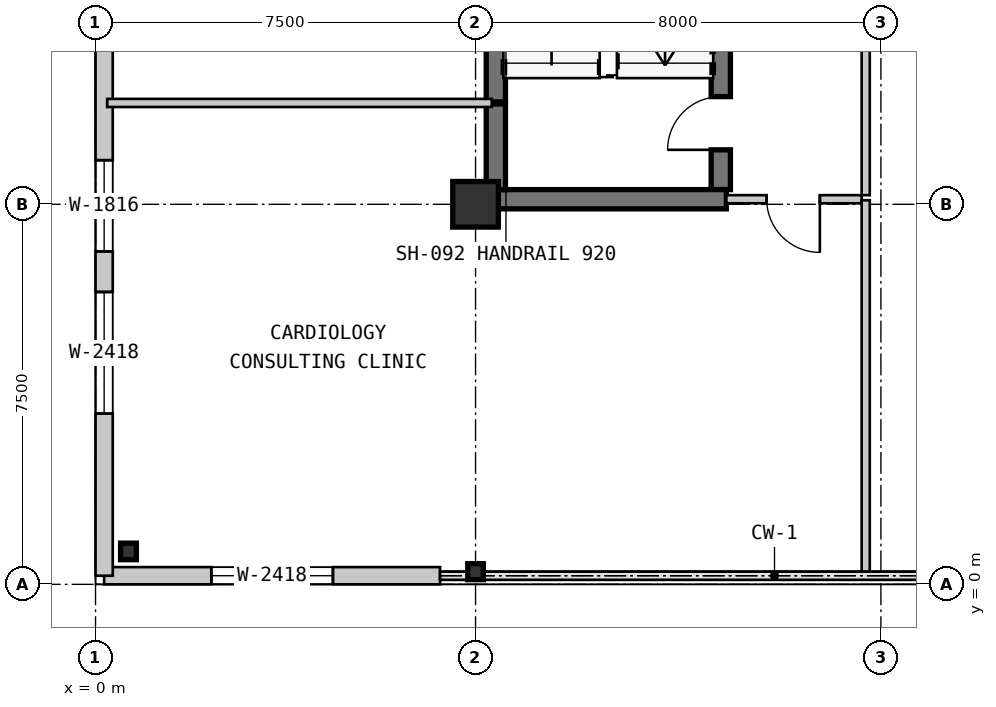
"""IFC4 building model, lengths in metres.
Left out: names, types, materials, properties, quantities, classifications, styles, units other than length and angle.
Written with IfcOpenShell. Run it as: python <this file> out.ifc"""

import sys

from ifc_helpers import new_model, si_unit, direction, frame, frame_2d, origin, origin_2d, place, context, subcontext, project, spatial, rectangle, circle, i_section, extrude, source, transform, mapped, element, fill, save


model = new_model("IFC4")
c1 = context("Model", 3, precision=1e-05, world=origin(), true_north=direction((0.0, 1.0)))
c2 = subcontext(c1, "Body", "Model", "MODEL_VIEW")
j1 = project(units=[si_unit("LENGTHUNIT", "METRE"), si_unit("PLANEANGLEUNIT", "RADIAN")], contexts=[c1])
p1 = place(None, origin())
s1 = spatial("IfcSite", under=j1, at=p1, CompositionType="ELEMENT")
p2 = place(p1, origin())
s2 = spatial("IfcBuilding", under=s1, at=p2, CompositionType="ELEMENT")
p3 = place(p2, frame((0.0, 0.0, 4.55)))
s3 = spatial("IfcBuildingStorey", under=s2, at=p3, CompositionType="ELEMENT", Elevation=4.55)
m1 = source(origin(), c2, "Body", "SweptSolid", [
    extrude(circle(Radius=0.45, at=origin_2d()), origin(), (0.0, 0.0, 1.0), 3.85),
])
p4 = place(p3, frame((7.5, 7.5, 0.0), z_axis=(0.0, 0.0, 1.0), x_axis=(1.0, 0.0, 0.0)))
e1 = element("IfcColumn", 1, at=p4, inside=s3, PredefinedType="COLUMN", context=c2, shape_type="MappedRepresentation", body=[
    mapped(m1, transform((0.0, 0.0, 0.0), scale=1.0)),
])
m2 = source(origin(), c2, "Body", "SweptSolid", [
    extrude(i_section(OverallWidth=0.311, OverallDepth=0.327, WebThickness=0.016, FlangeThickness=0.025, at=origin_2d()), origin(), (0.0, 0.0, 1.0), 3.85),
])
p5 = place(p3, frame((0.65, 0.65, 0.0), z_axis=(0.0, 0.0, 1.0), x_axis=(1.0, 0.0, 0.0)))
e2 = element("IfcColumn", 2, at=p5, inside=s3, PredefinedType="COLUMN", context=c2, shape_type="MappedRepresentation", body=[
    mapped(m2, transform((0.0, 0.0, 0.0), scale=1.0)),
])
m3 = source(origin(), c2, "Body", "SweptSolid", [
    extrude(i_section(OverallWidth=0.307, OverallDepth=0.315, WebThickness=0.012, FlangeThickness=0.019, at=origin_2d()), origin(), (0.0, 0.0, 1.0), 3.85),
])
p6 = place(p3, frame((7.5, 0.25, 0.0), z_axis=(0.0, 0.0, 1.0), x_axis=(1.0, 0.0, 0.0)))
e3 = element("IfcColumn", 3, at=p6, inside=s3, PredefinedType="PILASTER", context=c2, shape_type="MappedRepresentation", body=[
    mapped(m3, transform((0.0, 0.0, 0.0), scale=1.0)),
])
m4 = source(origin(), c2, "Body", "SweptSolid", [
    extrude(rectangle(XDim=6.63, YDim=0.34, at=frame_2d((3.315, 0.0))), origin(), (0.0, 0.0, 1.0), 3.59),
])
p7 = place(p3, frame((0.17, 0.17, 0.0), z_axis=(0.0, 0.0, 1.0), x_axis=(1.0, 0.0, 0.0)))
e4 = element("IfcWall", 4, at=p7, inside=s3, PredefinedType="SOLIDWALL", context=c2, shape_type="MappedRepresentation", body=[
    mapped(m4, transform((0.0, 0.0, 0.0), scale=1.0)),
])
m5 = source(origin(), c2, "Body", "SweptSolid", [
    extrude(rectangle(XDim=2.4, YDim=1.8, at=frame_2d((1.2, 0.9))), frame((0.0, 0.18, 0.0), z_axis=(0.0, -1.0, 0.0), x_axis=(1.0, 0.0, 0.0)), (0.0, 0.0, 1.0), 0.36),
])
p8 = place(p7, frame((2.115, 0.0, 0.9)))
e5 = element("IfcOpeningElement", 5, at=p8, cuts=e4, PredefinedType="OPENING", context=c2, shape_type="MappedRepresentation", body=[
    mapped(m5, transform((0.0, 0.0, 0.0), scale=1.0)),
])
m6 = source(origin(), c2, "Body", "SweptSolid", [
    extrude(rectangle(XDim=39.66, YDim=0.34, at=frame_2d((19.83, 0.0))), origin(), (0.0, 0.0, 1.0), 3.59),
])
p9 = place(p3, frame((0.17, 0.17, 0.0), z_axis=(0.0, 0.0, 1.0), x_axis=(0.0, 1.0, 0.0)))
e6 = element("IfcWall", 6, at=p9, inside=s3, PredefinedType="SOLIDWALL", context=c2, shape_type="MappedRepresentation", body=[
    mapped(m6, transform((0.0, 0.0, 0.0), scale=1.0)),
])
p10 = place(p9, frame((3.2, 0.0, 0.95)))
e7 = element("IfcOpeningElement", 7, at=p10, cuts=e6, PredefinedType="OPENING", context=c2, shape_type="MappedRepresentation", body=[
    mapped(m5, transform((0.0, 0.0, 0.0), scale=1.0)),
])
m7 = source(origin(), c2, "Body", "SweptSolid", [
    extrude(rectangle(XDim=1.8, YDim=1.6, at=frame_2d((0.9, 0.8))), frame((0.0, 0.18, 0.0), z_axis=(0.0, -1.0, 0.0), x_axis=(1.0, 0.0, 0.0)), (0.0, 0.0, 1.0), 0.36),
])
p11 = place(p9, frame((6.4, 0.0, 0.95)))
e8 = element("IfcOpeningElement", 8, at=p11, cuts=e6, PredefinedType="OPENING", context=c2, shape_type="MappedRepresentation", body=[
    mapped(m7, transform((0.0, 0.0, 0.0), scale=1.0)),
])
m8 = source(origin(), c2, "Body", "SweptSolid", [
    extrude(rectangle(XDim=1.5, YDim=1.5, at=frame_2d((0.75, 0.75))), frame((0.0, 0.18, 0.0), z_axis=(0.0, -1.0, 0.0), x_axis=(1.0, 0.0, 0.0)), (0.0, 0.0, 1.0), 0.36),
])
p12 = place(p9, frame((22.6, 0.0, 0.95)))
e9 = element("IfcOpeningElement", 9, at=p12, cuts=e6, PredefinedType="OPENING", context=c2, shape_type="MappedRepresentation", body=[
    mapped(m8, transform((0.0, 0.0, 0.0), scale=1.0)),
])
m9 = source(origin(), c2, "Body", "SweptSolid", [
    extrude(rectangle(XDim=1.2, YDim=1.5, at=frame_2d((0.6, 0.75))), frame((0.0, 0.18, 0.0), z_axis=(0.0, -1.0, 0.0), x_axis=(1.0, 0.0, 0.0)), (0.0, 0.0, 1.0), 0.36),
])
p13 = place(p9, frame((34.6, 0.0, 0.95)))
e10 = element("IfcOpeningElement", 10, at=p13, cuts=e6, PredefinedType="OPENING", context=c2, shape_type="MappedRepresentation", body=[
    mapped(m9, transform((0.0, 0.0, 0.0), scale=1.0)),
])
m10 = source(origin(), c2, "Body", "SweptSolid", [
    extrude(rectangle(XDim=8.22, YDim=0.38, at=frame_2d((4.11, 0.0))), origin(), (0.0, 0.0, 1.0), 3.59),
])
p14 = place(p3, frame((12.34, 16.01, 0.0), z_axis=(0.0, 0.0, 1.0), x_axis=(0.0, -1.0, 0.0)))
e11 = element("IfcWall", 11, at=p14, inside=s3, PredefinedType="SHEAR", context=c2, shape_type="MappedRepresentation", body=[
    mapped(m10, transform((0.0, 0.0, 0.0), scale=1.0)),
])
m11 = source(origin(), c2, "Body", "SweptSolid", [
    extrude(rectangle(XDim=1.05, YDim=2.1, at=frame_2d((0.525, 1.05))), frame((0.0, 0.2, 0.0), z_axis=(0.0, -1.0, 0.0), x_axis=(1.0, 0.0, 0.0)), (0.0, 0.0, 1.0), 0.4),
])
p15 = place(p14, frame((6.385, 0.0, 0.0)))
e12 = element("IfcOpeningElement", 12, at=p15, cuts=e11, PredefinedType="OPENING", context=c2, shape_type="MappedRepresentation", body=[
    mapped(m11, transform((0.0, 0.0, 0.0), scale=1.0)),
])
m12 = source(origin(), c2, "Body", "SweptSolid", [
    extrude(rectangle(XDim=4.66, YDim=0.38, at=frame_2d((2.33, 0.0))), origin(), (0.0, 0.0, 1.0), 3.59),
])
p16 = place(p3, frame((12.45, 7.6, 0.0), z_axis=(0.0, 0.0, 1.0), x_axis=(-1.0, 0.0, 0.0)))
e13 = element("IfcWall", 13, at=p16, inside=s3, PredefinedType="SHEAR", context=c2, shape_type="MappedRepresentation", body=[
    mapped(m12, transform((0.0, 0.0, 0.0), scale=1.0)),
])
m13 = source(origin(), c2, "Body", "SweptSolid", [
    extrude(rectangle(XDim=1.69, YDim=0.38, at=frame_2d((0.845, 0.0))), origin(), (0.0, 0.0, 1.0), 3.59),
])
p17 = place(p3, frame((7.9, 7.79, 0.0), z_axis=(0.0, 0.0, 1.0), x_axis=(0.0, 1.0, 0.0)))
e14 = element("IfcWall", 14, at=p17, inside=s3, PredefinedType="SHEAR", context=c2, shape_type="MappedRepresentation", body=[
    mapped(m13, transform((0.0, 0.0, 0.0), scale=1.0)),
])
m14 = source(origin(), c2, "Body", "SweptSolid", [
    extrude(rectangle(XDim=6.49, YDim=0.38, at=frame_2d((3.245, 0.0))), origin(), (0.0, 0.0, 1.0), 3.59),
])
p18 = place(p3, frame((7.9, 9.52, 0.0), z_axis=(0.0, 0.0, 1.0), x_axis=(0.0, 1.0, 0.0)))
e15 = element("IfcWall", 15, at=p18, inside=s3, PredefinedType="SHEAR", context=c2, shape_type="MappedRepresentation", body=[
    mapped(m14, transform((0.0, 0.0, 0.0), scale=1.0)),
])
m15 = source(origin(), c2, "Body", "SweptSolid", [
    extrude(rectangle(XDim=13.44, YDim=0.16, at=frame_2d((6.72, 0.0))), origin(), (0.0, 0.0, 1.0), 3.59),
])
p19 = place(p3, frame((15.2, 21.12, 0.0), z_axis=(0.0, 0.0, 1.0), x_axis=(0.0, -1.0, 0.0)))
e16 = element("IfcWall", 16, at=p19, inside=s3, PredefinedType="PARTITIONING", context=c2, shape_type="MappedRepresentation", body=[
    mapped(m15, transform((0.0, 0.0, 0.0), scale=1.0)),
])
m16 = source(origin(), c2, "Body", "SweptSolid", [
    extrude(rectangle(XDim=1.05, YDim=2.1, at=frame_2d((0.525, 1.05))), frame((0.0, 0.09, 0.0), z_axis=(0.0, -1.0, 0.0), x_axis=(1.0, 0.0, 0.0)), (0.0, 0.0, 1.0), 0.18),
])
p20 = place(p19, frame((6.165, 0.0, 0.0)))
e17 = element("IfcOpeningElement", 17, at=p20, cuts=e16, PredefinedType="OPENING", context=c2, shape_type="MappedRepresentation", body=[
    mapped(m16, transform((0.0, 0.0, 0.0), scale=1.0)),
])
m17 = source(origin(), c2, "Body", "SweptSolid", [
    extrude(rectangle(XDim=2.67, YDim=0.16, at=frame_2d((1.335, 0.0))), origin(), (0.0, 0.0, 1.0), 3.59),
])
p21 = place(p3, frame((15.12, 7.6, 0.0), z_axis=(0.0, 0.0, 1.0), x_axis=(-1.0, 0.0, 0.0)))
e18 = element("IfcWall", 18, at=p21, inside=s3, PredefinedType="PARTITIONING", context=c2, shape_type="MappedRepresentation", body=[
    mapped(m17, transform((0.0, 0.0, 0.0), scale=1.0)),
])
p22 = place(p21, frame((0.825, 0.0, 0.0)))
e19 = element("IfcOpeningElement", 19, at=p22, cuts=e18, PredefinedType="OPENING", context=c2, shape_type="MappedRepresentation", body=[
    mapped(m16, transform((0.0, 0.0, 0.0), scale=1.0)),
])
m18 = source(origin(), c2, "Body", "SweptSolid", [
    extrude(rectangle(XDim=7.35, YDim=0.16, at=frame_2d((3.675, 0.0))), origin(), (0.0, 0.0, 1.0), 3.59),
])
p23 = place(p3, frame((15.2, 0.23, 0.0), z_axis=(0.0, 0.0, 1.0), x_axis=(0.0, 1.0, 0.0)))
e20 = element("IfcWall", 20, at=p23, inside=s3, PredefinedType="PARTITIONING", context=c2, shape_type="MappedRepresentation", body=[
    mapped(m18, transform((0.0, 0.0, 0.0), scale=1.0)),
])
m19 = source(origin(), c2, "Body", "SweptSolid", [
    extrude(rectangle(XDim=7.59, YDim=0.16, at=frame_2d((3.795, 0.0))), origin(), (0.0, 0.0, 1.0), 3.59),
])
p24 = place(p3, frame((0.23, 9.5, 0.0), z_axis=(0.0, 0.0, 1.0), x_axis=(1.0, 0.0, 0.0)))
e21 = element("IfcWall", 21, at=p24, inside=s3, PredefinedType="PARTITIONING", context=c2, shape_type="MappedRepresentation", body=[
    mapped(m19, transform((0.0, 0.0, 0.0), scale=1.0)),
])
m20 = source(origin(), c2, "Body", "SweptSolid", [
    extrude(rectangle(XDim=2.4, YDim=1.8, at=frame_2d((1.2, 0.9))), frame((0.0, 0.03, 0.0), z_axis=(0.0, -1.0, 0.0), x_axis=(1.0, 0.0, 0.0)), (0.0, 0.0, 1.0), 0.06),
])
p25 = place(p8, origin())
e22 = element("IfcWindow", 22, at=p25, inside=s3, PartitioningType="SINGLE_PANEL", PredefinedType="WINDOW", context=c2, shape_type="MappedRepresentation", body=[
    mapped(m20, transform((0.0, 0.0, 0.0), scale=1.0)),
])
fill(e5, e22)
p26 = place(p10, origin())
e23 = element("IfcWindow", 23, at=p26, inside=s3, PartitioningType="SINGLE_PANEL", PredefinedType="WINDOW", context=c2, shape_type="MappedRepresentation", body=[
    mapped(m20, transform((0.0, 0.0, 0.0), scale=1.0)),
])
fill(e7, e23)
m21 = source(origin(), c2, "Body", "SweptSolid", [
    extrude(rectangle(XDim=1.8, YDim=1.6, at=frame_2d((0.9, 0.8))), frame((0.0, 0.03, 0.0), z_axis=(0.0, -1.0, 0.0), x_axis=(1.0, 0.0, 0.0)), (0.0, 0.0, 1.0), 0.06),
])
p27 = place(p11, origin())
e24 = element("IfcWindow", 24, at=p27, inside=s3, PartitioningType="SINGLE_PANEL", PredefinedType="WINDOW", context=c2, shape_type="MappedRepresentation", body=[
    mapped(m21, transform((0.0, 0.0, 0.0), scale=1.0)),
])
fill(e8, e24)
m22 = source(origin(), c2, "Body", "SweptSolid", [
    extrude(rectangle(XDim=1.05, YDim=2.1, at=frame_2d((0.525, 1.05))), frame((0.0, 0.025, 0.0), z_axis=(0.0, -1.0, 0.0), x_axis=(1.0, 0.0, 0.0)), (0.0, 0.0, 1.0), 0.05),
])
p28 = place(p15, frame((1.05, 0.0, 0.0), z_axis=(0.0, 0.0, 1.0), x_axis=(-1.0, 0.0, 0.0)))
e25 = element("IfcDoor", 25, at=p28, inside=s3, OperationType="SINGLE_SWING_LEFT", PredefinedType="DOOR", context=c2, shape_type="MappedRepresentation", body=[
    mapped(m22, transform((0.0, 0.0, 0.0), scale=1.0)),
])
fill(e12, e25)
p29 = place(p22, origin())
e26 = element("IfcDoor", 26, at=p29, inside=s3, OperationType="SINGLE_SWING_LEFT", PredefinedType="DOOR", context=c2, shape_type="MappedRepresentation", body=[
    mapped(m22, transform((0.0, 0.0, 0.0), scale=1.0)),
])
fill(e19, e26)
save(model, sys.argv[1])
